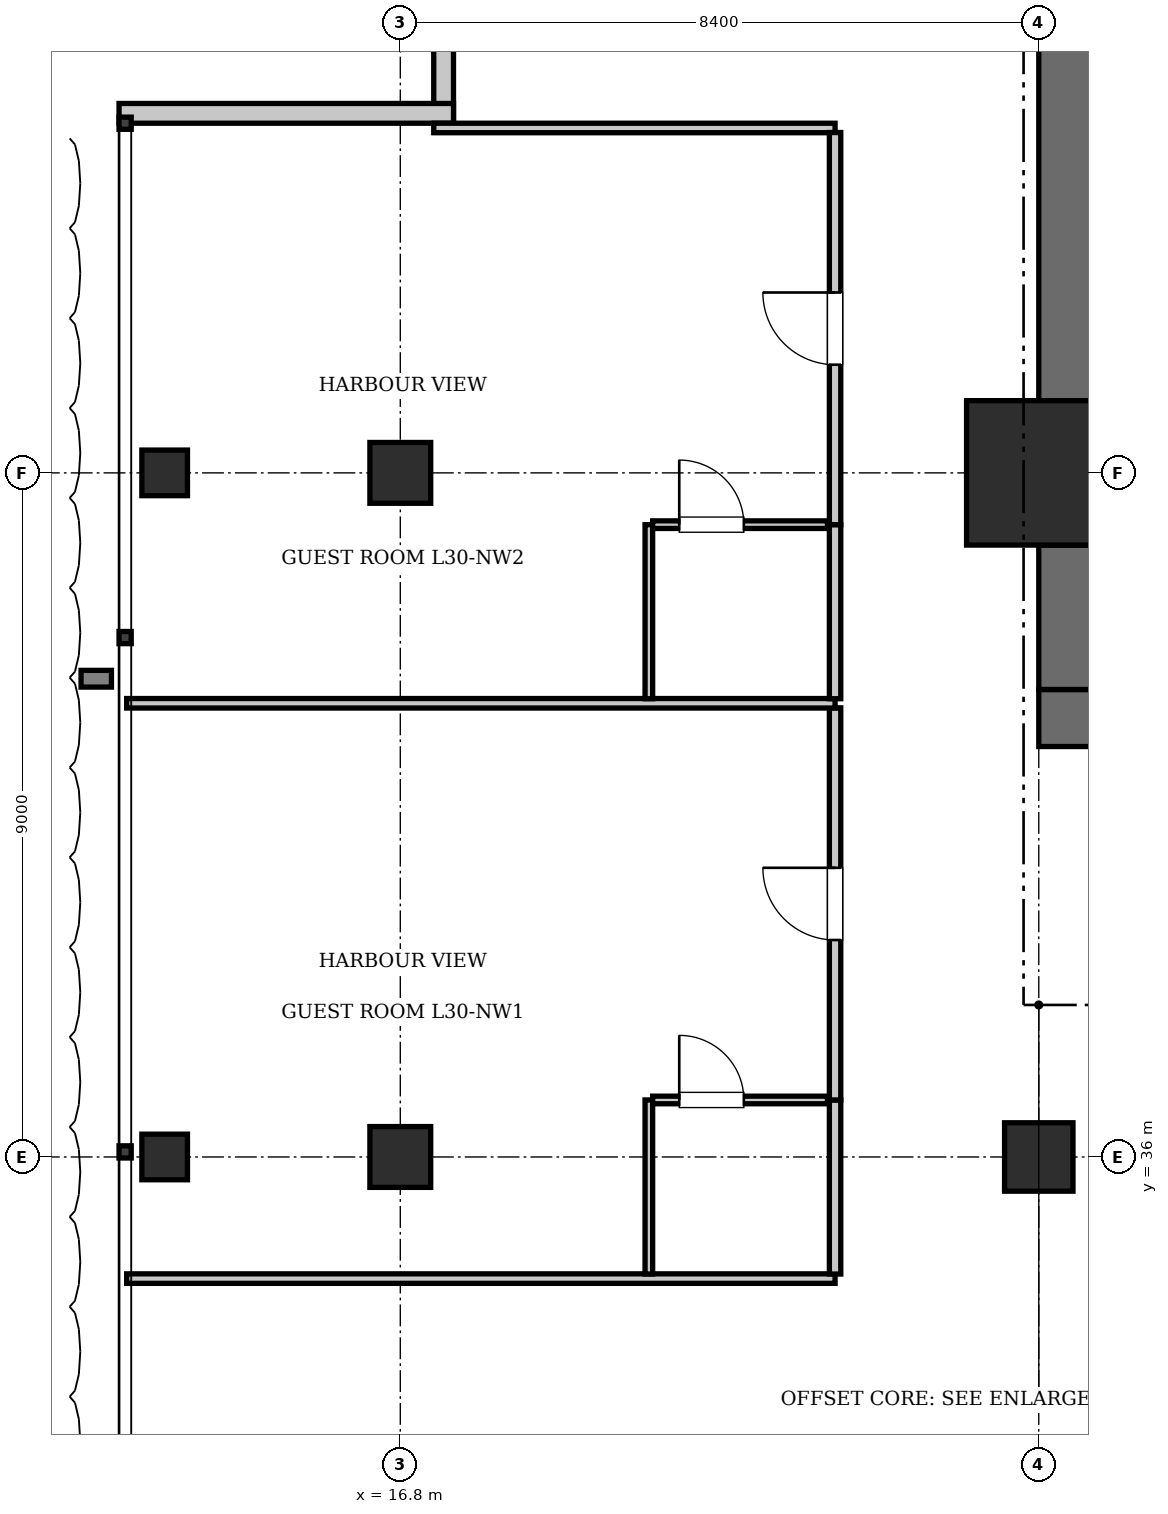
"""IFC4 building model, lengths in metres.
Left out: names, types, materials, properties, quantities, classifications, styles, units other than length and angle.
Written with IfcOpenShell. Run it as: python <this file> out.ifc"""

import sys

from ifc_helpers import new_model, si_unit, direction, frame, frame_2d, origin, origin_2d, place, context, subcontext, project, spatial, rectangle, i_section, extrude, element, fill, save


model = new_model("IFC4")
c1 = context("Model", 3, precision=1e-05, world=origin(), true_north=direction((0.0, 1.0)))
c2 = subcontext(c1, "Body", "Model", "MODEL_VIEW")
j1 = project(units=[si_unit("LENGTHUNIT", "METRE"), si_unit("PLANEANGLEUNIT", "RADIAN")], contexts=[c1])
p1 = place(None, origin())
s1 = spatial("IfcSite", under=j1, at=p1, CompositionType="ELEMENT")
p2 = place(p1, origin())
s2 = spatial("IfcBuilding", under=s1, at=p2, CompositionType="ELEMENT")
p3 = place(p2, frame((0.0, 0.0, 127.4)))
s3 = spatial("IfcBuildingStorey", under=s2, at=p3, CompositionType="ELEMENT", Elevation=127.4)
p4 = place(p3, frame((25.2, 45.0, 0.0), z_axis=(0.0, 0.0, 1.0), x_axis=(1.0, 0.0, 0.0)))
e1 = element("IfcColumn", 1, at=p4, inside=s3, PredefinedType="COLUMN", context=c2, shape_type="SweptSolid", body=[
    extrude(rectangle(XDim=1.9, YDim=1.9, at=origin_2d()), origin(), (0.0, 0.0, 1.0), 3.85),
])
p5 = place(p3, frame((25.2, 41.775, 0.0), z_axis=(0.0, 0.0, 1.0), x_axis=(1.0, 0.0, 0.0)))
e2 = element("IfcWall", 2, at=p5, inside=s3, PredefinedType="SHEAR", context=c2, shape_type="SweptSolid", body=[
    extrude(rectangle(XDim=6.8, YDim=0.75, at=frame_2d((3.4, 0.0))), origin(), (0.0, 0.0, 1.0), 3.85),
])
p6 = place(p5, frame((1.65, 0.0, 0.0)))
e3 = element("IfcOpeningElement", 3, at=p6, cuts=e2, PredefinedType="OPENING", context=c2, shape_type="SweptSolid", body=[
    extrude(rectangle(XDim=1.15, YDim=2.15, at=frame_2d((0.575, 1.075))), frame((0.0, 0.385, 0.0), z_axis=(0.0, -1.0, 0.0), x_axis=(1.0, 0.0, 0.0)), (0.0, 0.0, 1.0), 0.77),
])
p7 = place(p5, frame((5.15, 0.0, 0.0)))
e4 = element("IfcOpeningElement", 4, at=p7, cuts=e2, PredefinedType="OPENING", context=c2, shape_type="SweptSolid", body=[
    extrude(rectangle(XDim=1.1, YDim=2.2, at=frame_2d((0.55, 1.1))), frame((0.0, 0.385, 0.0), z_axis=(0.0, -1.0, 0.0), x_axis=(1.0, 0.0, 0.0)), (0.0, 0.0, 1.0), 0.77),
])
p8 = place(p3, frame((25.575, 42.15, 0.0), z_axis=(0.0, 0.0, 1.0), x_axis=(0.0, 1.0, 0.0)))
e5 = element("IfcWall", 5, at=p8, inside=s3, PredefinedType="SHEAR", context=c2, shape_type="SweptSolid", body=[
    extrude(rectangle(XDim=1.9, YDim=0.75, at=frame_2d((0.95, 0.0))), origin(), (0.0, 0.0, 1.0), 3.85),
])
p9 = place(p3, frame((25.575, 45.95, 0.0), z_axis=(0.0, 0.0, 1.0), x_axis=(0.0, 1.0, 0.0)))
e6 = element("IfcWall", 6, at=p9, inside=s3, PredefinedType="SHEAR", context=c2, shape_type="SweptSolid", body=[
    extrude(rectangle(XDim=7.3, YDim=0.75, at=frame_2d((3.65, 0.0))), origin(), (0.0, 0.0, 1.0), 3.85),
])
p10 = place(p3, frame((25.2, 36.0, 0.0), z_axis=(0.0, 0.0, 1.0), x_axis=(1.0, 0.0, 0.0)))
e7 = element("IfcColumn", 7, at=p10, inside=s3, PredefinedType="COLUMN", context=c2, shape_type="SweptSolid", body=[
    extrude(rectangle(XDim=0.9, YDim=0.9, at=origin_2d()), origin(), (0.0, 0.0, 1.0), 3.85),
])
for number, where, z_axis, x_axis in (
    (8, (16.8, 36.0, 0.0), (0.0, 0.0, 1.0), (1.0, 0.0, 0.0)),
    (9, (16.8, 45.0, 0.0), (0.0, 0.0, 1.0), (1.0, 0.0, 0.0)),
):
    element("IfcColumn", number, at=place(p3, frame(where, z_axis=z_axis, x_axis=x_axis)), inside=s3, PredefinedType="COLUMN", context=c2, shape_type="SweptSolid", body=[
        extrude(rectangle(XDim=0.8, YDim=0.8, at=origin_2d()), origin(), (0.0, 0.0, 1.0), 3.85),
    ])
for number, where, z_axis, x_axis in (
    (10, (13.7, 36.0, 0.0), (0.0, 0.0, 1.0), (1.0, 0.0, 0.0)),
    (11, (13.7, 45.0, 0.0), (0.0, 0.0, 1.0), (1.0, 0.0, 0.0)),
):
    element("IfcColumn", number, at=place(p3, frame(where, z_axis=z_axis, x_axis=x_axis)), inside=s3, PredefinedType="COLUMN", context=c2, shape_type="SweptSolid", body=[
        extrude(i_section(OverallWidth=0.6, OverallDepth=0.6, WebThickness=0.025, FlangeThickness=0.038, at=origin_2d()), origin(), (0.0, 0.0, 1.0), 3.85),
    ])
for number, where, z_axis, x_axis in (
    (12, (17.37, 49.6, 0.0), (0.0, 0.0, 1.0), (0.0, 1.0, 0.0)),
    (13, (13.1, 49.73, 0.0), (0.0, 0.0, 1.0), (1.0, 0.0, 0.0)),
):
    element("IfcWall", number, at=place(p3, frame(where, z_axis=z_axis, x_axis=x_axis)), inside=s3, PredefinedType="SOLIDWALL", context=c2, shape_type="SweptSolid", body=[
        extrude(rectangle(XDim=4.4, YDim=0.26, at=frame_2d((2.2, 0.0))), origin(), (0.0, 0.0, 1.0), 3.61),
    ])
p11 = place(p3, frame((13.2, 34.4, 0.0), z_axis=(0.0, 0.0, 1.0), x_axis=(1.0, 0.0, 0.0)))
e14 = element("IfcWall", 14, at=p11, inside=s3, PredefinedType="PARTITIONING", context=c2, shape_type="SweptSolid", body=[
    extrude(rectangle(XDim=9.32, YDim=0.125, at=frame_2d((4.66, 0.0))), origin(), (0.0, 0.0, 1.0), 3.61),
])
p12 = place(p3, frame((17.24, 49.538, 0.0), z_axis=(0.0, 0.0, 1.0), x_axis=(1.0, 0.0, 0.0)))
e15 = element("IfcWall", 15, at=p12, inside=s3, PredefinedType="PARTITIONING", context=c2, shape_type="SweptSolid", body=[
    extrude(rectangle(XDim=5.28, YDim=0.125, at=frame_2d((2.64, 0.0))), origin(), (0.0, 0.0, 1.0), 3.61),
])
p13 = place(p3, frame((22.52, 34.46, 0.0), z_axis=(0.0, 0.0, 1.0), x_axis=(0.0, 1.0, 0.0)))
e16 = element("IfcWall", 16, at=p13, inside=s3, PredefinedType="PARTITIONING", context=c2, shape_type="SweptSolid", body=[
    extrude(rectangle(XDim=2.29, YDim=0.15, at=frame_2d((1.145, 0.0))), origin(), (0.0, 0.0, 1.0), 3.61),
])
p14 = place(p3, frame((22.52, 36.75, 0.0), z_axis=(0.0, 0.0, 1.0), x_axis=(0.0, 1.0, 0.0)))
e17 = element("IfcWall", 17, at=p14, inside=s3, PredefinedType="PARTITIONING", context=c2, shape_type="SweptSolid", body=[
    extrude(rectangle(XDim=5.159, YDim=0.15, at=frame_2d((2.579, 0.0))), origin(), (0.0, 0.0, 1.0), 3.61),
])
p15 = place(p14, frame((2.104, 0.0, 0.0)))
e18 = element("IfcOpeningElement", 18, at=p15, cuts=e17, PredefinedType="OPENING", context=c2, shape_type="SweptSolid", body=[
    extrude(rectangle(XDim=0.95, YDim=2.15, at=frame_2d((0.475, 1.075))), frame((0.0, 0.085, 0.0), z_axis=(0.0, -1.0, 0.0), x_axis=(1.0, 0.0, 0.0)), (0.0, 0.0, 1.0), 0.17),
])
p16 = place(p3, frame((20.07, 34.46, 0.0), z_axis=(0.0, 0.0, 1.0), x_axis=(0.0, 1.0, 0.0)))
e19 = element("IfcWall", 19, at=p16, inside=s3, PredefinedType="PARTITIONING", context=c2, shape_type="SweptSolid", body=[
    extrude(rectangle(XDim=2.29, YDim=0.1, at=frame_2d((1.145, 0.0))), origin(), (0.0, 0.0, 1.0), 3.61),
])
p17 = place(p3, frame((20.12, 36.75, 0.0), z_axis=(0.0, 0.0, 1.0), x_axis=(1.0, 0.0, 0.0)))
e20 = element("IfcWall", 20, at=p17, inside=s3, PredefinedType="PARTITIONING", context=c2, shape_type="SweptSolid", body=[
    extrude(rectangle(XDim=2.3, YDim=0.1, at=frame_2d((1.15, 0.0))), origin(), (0.0, 0.0, 1.0), 3.61),
])
p18 = place(p17, frame((0.35, 0.0, 0.0)))
e21 = element("IfcOpeningElement", 21, at=p18, cuts=e20, PredefinedType="OPENING", context=c2, shape_type="SweptSolid", body=[
    extrude(rectangle(XDim=0.85, YDim=2.1, at=frame_2d((0.425, 1.05))), frame((0.0, 0.06, 0.0), z_axis=(0.0, -1.0, 0.0), x_axis=(1.0, 0.0, 0.0)), (0.0, 0.0, 1.0), 0.12),
])
p19 = place(p3, frame((13.2, 41.969, 0.0), z_axis=(0.0, 0.0, 1.0), x_axis=(1.0, 0.0, 0.0)))
e22 = element("IfcWall", 22, at=p19, inside=s3, PredefinedType="PARTITIONING", context=c2, shape_type="SweptSolid", body=[
    extrude(rectangle(XDim=9.32, YDim=0.125, at=frame_2d((4.66, 0.0))), origin(), (0.0, 0.0, 1.0), 3.61),
])
p20 = place(p3, frame((22.52, 42.029, 0.0), z_axis=(0.0, 0.0, 1.0), x_axis=(0.0, 1.0, 0.0)))
e23 = element("IfcWall", 23, at=p20, inside=s3, PredefinedType="PARTITIONING", context=c2, shape_type="SweptSolid", body=[
    extrude(rectangle(XDim=2.29, YDim=0.15, at=frame_2d((1.145, 0.0))), origin(), (0.0, 0.0, 1.0), 3.61),
])
p21 = place(p3, frame((22.52, 44.319, 0.0), z_axis=(0.0, 0.0, 1.0), x_axis=(0.0, 1.0, 0.0)))
e24 = element("IfcWall", 24, at=p21, inside=s3, PredefinedType="PARTITIONING", context=c2, shape_type="SweptSolid", body=[
    extrude(rectangle(XDim=5.159, YDim=0.15, at=frame_2d((2.579, 0.0))), origin(), (0.0, 0.0, 1.0), 3.61),
])
p22 = place(p21, frame((2.104, 0.0, 0.0)))
e25 = element("IfcOpeningElement", 25, at=p22, cuts=e24, PredefinedType="OPENING", context=c2, shape_type="SweptSolid", body=[
    extrude(rectangle(XDim=0.95, YDim=2.15, at=frame_2d((0.475, 1.075))), frame((0.0, 0.085, 0.0), z_axis=(0.0, -1.0, 0.0), x_axis=(1.0, 0.0, 0.0)), (0.0, 0.0, 1.0), 0.17),
])
p23 = place(p3, frame((20.07, 42.029, 0.0), z_axis=(0.0, 0.0, 1.0), x_axis=(0.0, 1.0, 0.0)))
e26 = element("IfcWall", 26, at=p23, inside=s3, PredefinedType="PARTITIONING", context=c2, shape_type="SweptSolid", body=[
    extrude(rectangle(XDim=2.29, YDim=0.1, at=frame_2d((1.145, 0.0))), origin(), (0.0, 0.0, 1.0), 3.61),
])
p24 = place(p3, frame((20.12, 44.319, 0.0), z_axis=(0.0, 0.0, 1.0), x_axis=(1.0, 0.0, 0.0)))
e27 = element("IfcWall", 27, at=p24, inside=s3, PredefinedType="PARTITIONING", context=c2, shape_type="SweptSolid", body=[
    extrude(rectangle(XDim=2.3, YDim=0.1, at=frame_2d((1.15, 0.0))), origin(), (0.0, 0.0, 1.0), 3.61),
])
p25 = place(p24, frame((0.35, 0.0, 0.0)))
e28 = element("IfcOpeningElement", 28, at=p25, cuts=e27, PredefinedType="OPENING", context=c2, shape_type="SweptSolid", body=[
    extrude(rectangle(XDim=0.85, YDim=2.1, at=frame_2d((0.425, 1.05))), frame((0.0, 0.06, 0.0), z_axis=(0.0, -1.0, 0.0), x_axis=(1.0, 0.0, 0.0)), (0.0, 0.0, 1.0), 0.12),
])
p26 = place(p18, origin())
e29 = element("IfcDoor", 29, at=p26, inside=s3, OperationType="SINGLE_SWING_LEFT", PredefinedType="DOOR", context=c2, shape_type="SweptSolid", body=[
    extrude(rectangle(XDim=0.85, YDim=2.1, at=frame_2d((0.425, 1.05))), frame((0.0, 0.025, 0.0), z_axis=(0.0, -1.0, 0.0), x_axis=(1.0, 0.0, 0.0)), (0.0, 0.0, 1.0), 0.05),
])
fill(e21, e29)
p27 = place(p15, origin())
e30 = element("IfcDoor", 30, at=p27, inside=s3, OperationType="SINGLE_SWING_RIGHT", PredefinedType="DOOR", context=c2, shape_type="SweptSolid", body=[
    extrude(rectangle(XDim=0.95, YDim=2.15, at=frame_2d((0.475, 1.075))), frame((0.0, 0.025, 0.0), z_axis=(0.0, -1.0, 0.0), x_axis=(1.0, 0.0, 0.0)), (0.0, 0.0, 1.0), 0.05),
])
fill(e18, e30)
p28 = place(p25, origin())
e31 = element("IfcDoor", 31, at=p28, inside=s3, OperationType="SINGLE_SWING_LEFT", PredefinedType="DOOR", context=c2, shape_type="SweptSolid", body=[
    extrude(rectangle(XDim=0.85, YDim=2.1, at=frame_2d((0.425, 1.05))), frame((0.0, 0.025, 0.0), z_axis=(0.0, -1.0, 0.0), x_axis=(1.0, 0.0, 0.0)), (0.0, 0.0, 1.0), 0.05),
])
fill(e28, e31)
p29 = place(p22, origin())
e32 = element("IfcDoor", 32, at=p29, inside=s3, OperationType="SINGLE_SWING_RIGHT", PredefinedType="DOOR", context=c2, shape_type="SweptSolid", body=[
    extrude(rectangle(XDim=0.95, YDim=2.15, at=frame_2d((0.475, 1.075))), frame((0.0, 0.025, 0.0), z_axis=(0.0, -1.0, 0.0), x_axis=(1.0, 0.0, 0.0)), (0.0, 0.0, 1.0), 0.05),
])
fill(e25, e32)
save(model, sys.argv[1])
